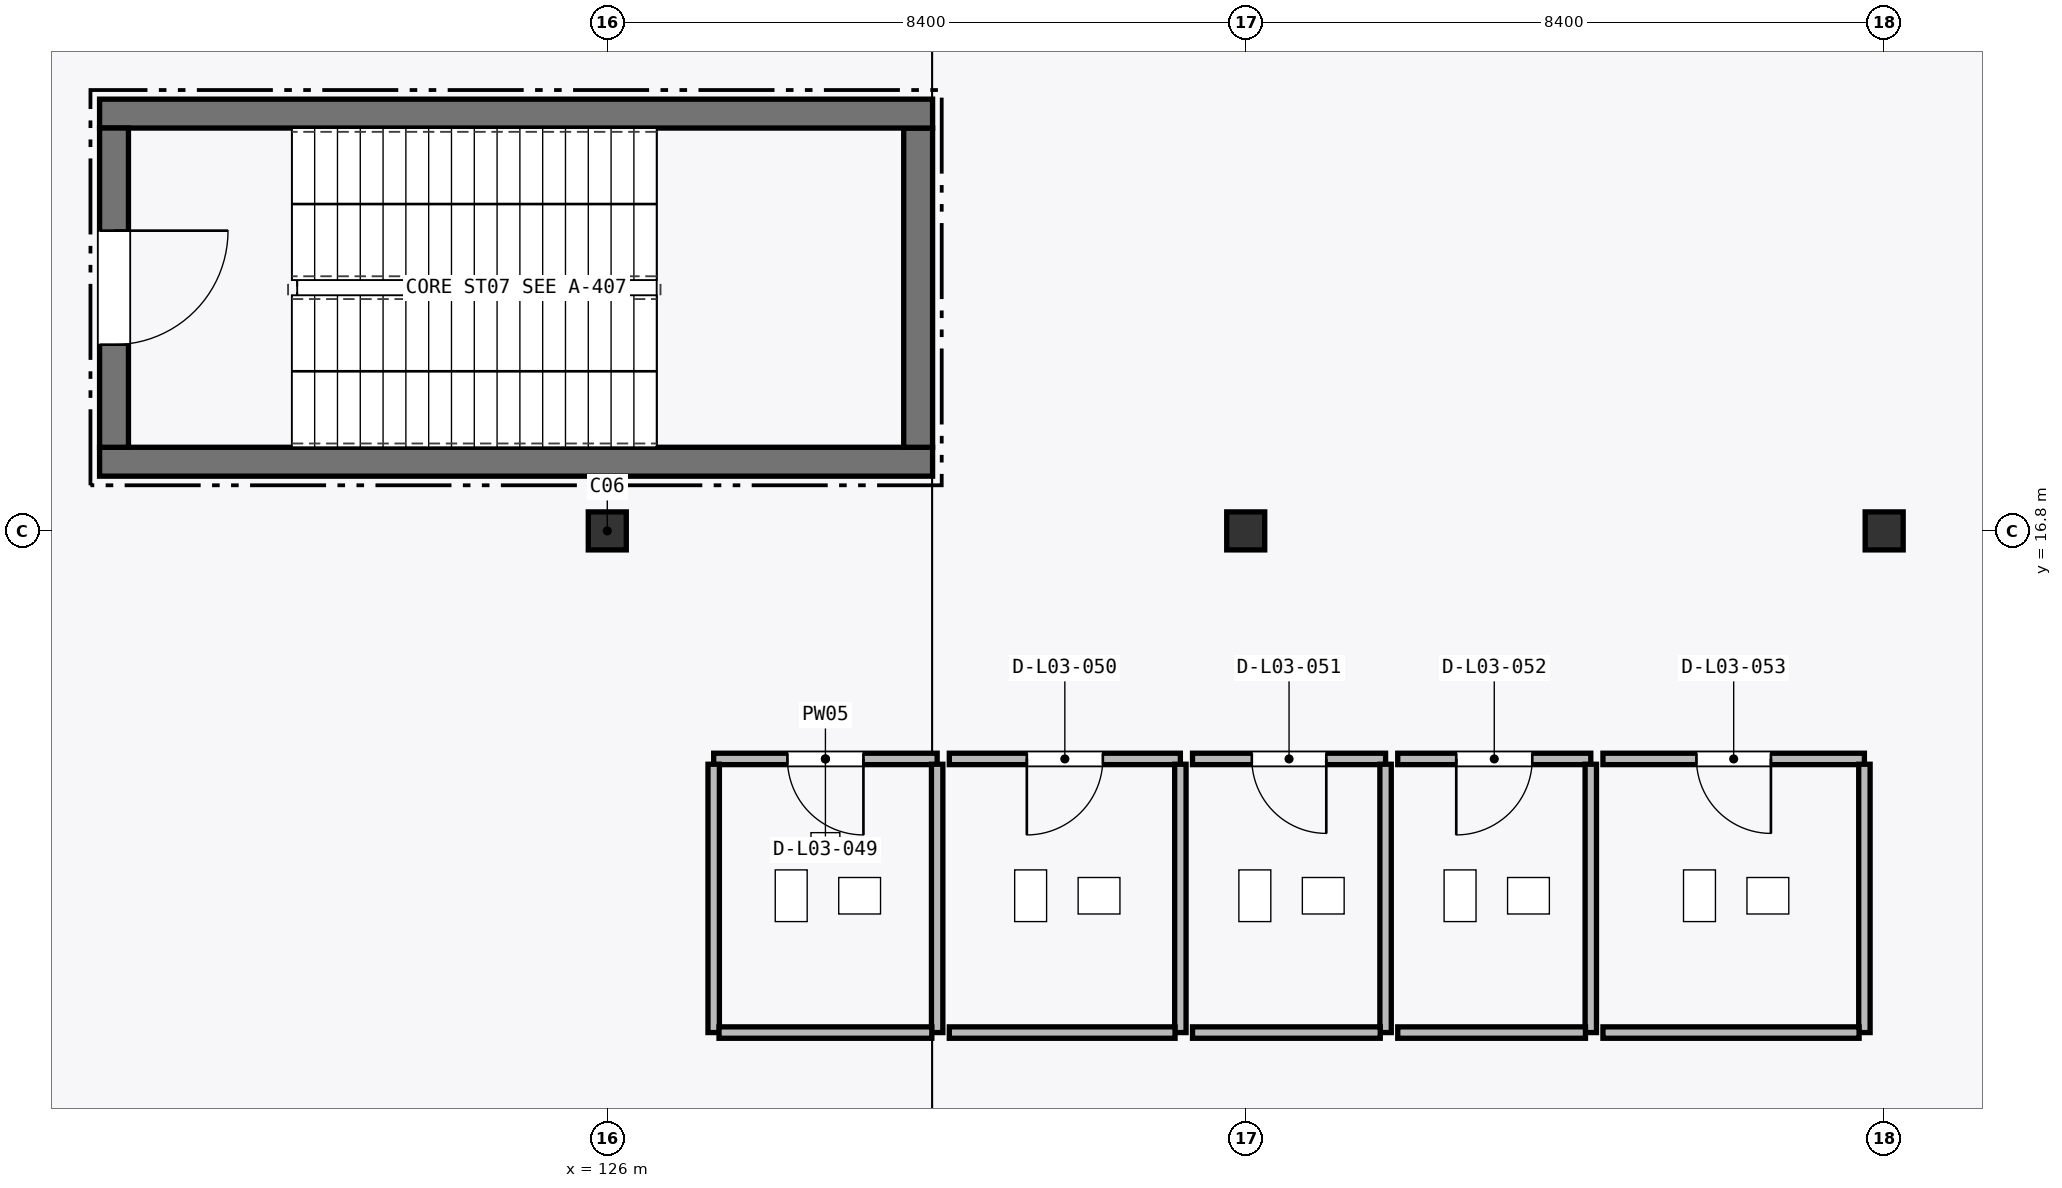
"""IFC4 building model, lengths in metres.
Left out: names, types, materials, properties, quantities, classifications, styles, units other than length and angle.
Written with IfcOpenShell. Run it as: python <this file> out.ifc"""

import sys

from ifc_helpers import new_model, si_unit, direction, frame, frame_2d, origin, origin_2d, place, context, subcontext, project, spatial, rectangle, hollow_rectangle, extrude, element, fill, save


model = new_model("IFC4")
c1 = context("Model", 3, precision=1e-05, world=origin(), true_north=direction((0.0, 1.0)))
c2 = subcontext(c1, "Body", "Model", "MODEL_VIEW")
j1 = project(units=[si_unit("LENGTHUNIT", "METRE"), si_unit("PLANEANGLEUNIT", "RADIAN")], contexts=[c1])
p1 = place(None, origin())
s1 = spatial("IfcSite", under=j1, at=p1, CompositionType="ELEMENT")
p2 = place(p1, origin())
s2 = spatial("IfcBuilding", under=s1, at=p2, CompositionType="ELEMENT")
p3 = place(p2, frame((0.0, 0.0, 11.4)))
s3 = spatial("IfcBuildingStorey", under=s2, at=p3, CompositionType="ELEMENT", Elevation=11.4)
for number, where, z_axis, x_axis in (
    (1, (126.0, 16.8, 0.0), (0.0, 0.0, 1.0), (1.0, 0.0, 0.0)),
    (2, (134.4, 16.8, 0.0), (0.0, 0.0, 1.0), (1.0, 0.0, 0.0)),
    (3, (142.8, 16.8, 0.0), (0.0, 0.0, 1.0), (1.0, 0.0, 0.0)),
):
    element("IfcColumn", number, at=place(p3, frame(where, z_axis=z_axis, x_axis=x_axis)), inside=s3, PredefinedType="COLUMN", context=c2, shape_type="SweptSolid", body=[
        extrude(hollow_rectangle(XDim=0.5, YDim=0.5, WallThickness=0.02, at=origin_2d()), origin(), (0.0, 0.0, 1.0), 5.1),
    ])
p4 = place(p3, frame((119.32, 17.71, 0.0), z_axis=(0.0, 0.0, 1.0), x_axis=(1.0, 0.0, 0.0)))
e4 = element("IfcWall", 4, at=p4, inside=s3, PredefinedType="SHEAR", context=c2, shape_type="SweptSolid", body=[
    extrude(rectangle(XDim=10.96, YDim=0.38, at=frame_2d((5.48, 0.0))), origin(), (0.0, 0.0, 1.0), 4.845),
])
p5 = place(p3, frame((130.09, 17.9, 0.0), z_axis=(0.0, 0.0, 1.0), x_axis=(0.0, 1.0, 0.0)))
e5 = element("IfcWall", 5, at=p5, inside=s3, PredefinedType="SHEAR", context=c2, shape_type="SweptSolid", body=[
    extrude(rectangle(XDim=4.2, YDim=0.38, at=frame_2d((2.1, 0.0))), origin(), (0.0, 0.0, 1.0), 4.845),
])
p6 = place(p3, frame((130.28, 22.29, 0.0), z_axis=(0.0, 0.0, 1.0), x_axis=(-1.0, 0.0, 0.0)))
e6 = element("IfcWall", 6, at=p6, inside=s3, PredefinedType="SHEAR", context=c2, shape_type="SweptSolid", body=[
    extrude(rectangle(XDim=10.96, YDim=0.38, at=frame_2d((5.48, 0.0))), origin(), (0.0, 0.0, 1.0), 4.845),
])
p7 = place(p3, frame((119.51, 22.1, 0.0), z_axis=(0.0, 0.0, 1.0), x_axis=(0.0, -1.0, 0.0)))
e7 = element("IfcWall", 7, at=p7, inside=s3, PredefinedType="SHEAR", context=c2, shape_type="SweptSolid", body=[
    extrude(rectangle(XDim=4.2, YDim=0.38, at=frame_2d((2.1, 0.0))), origin(), (0.0, 0.0, 1.0), 4.845),
])
p8 = place(p7, frame((1.35, 0.0, 0.0)))
e8 = element("IfcOpeningElement", 8, at=p8, cuts=e7, PredefinedType="OPENING", context=c2, shape_type="SweptSolid", body=[
    extrude(rectangle(XDim=1.5, YDim=2.15, at=frame_2d((0.75, 1.075))), frame((0.0, 0.2, 0.0), z_axis=(0.0, -1.0, 0.0), x_axis=(1.0, 0.0, 0.0)), (0.0, 0.0, 1.0), 0.4),
])
p9 = place(p3, frame((130.34, 13.8, 0.0), z_axis=(0.0, 0.0, 1.0), x_axis=(-1.0, 0.0, 0.0)))
e9 = element("IfcWall", 9, at=p9, inside=s3, PredefinedType="PARTITIONING", context=c2, shape_type="SweptSolid", body=[
    extrude(rectangle(XDim=2.94, YDim=0.15, at=frame_2d((1.47, 0.0))), origin(), (0.0, 0.0, 1.0), 4.845),
])
p10 = place(p9, frame((0.97, 0.0, 0.0)))
e10 = element("IfcOpeningElement", 10, at=p10, cuts=e9, PredefinedType="OPENING", context=c2, shape_type="SweptSolid", body=[
    extrude(rectangle(XDim=1.0, YDim=2.1, at=frame_2d((0.5, 1.05))), frame((0.0, 0.085, 0.0), z_axis=(0.0, -1.0, 0.0), x_axis=(1.0, 0.0, 0.0)), (0.0, 0.0, 1.0), 0.17),
])
for number, where, z_axis, x_axis in (
    (11, (130.34, 10.2, 0.0), (0.0, 0.0, 1.0), (0.0, 1.0, 0.0)),
    (12, (127.4, 13.73, 0.0), (0.0, 0.0, 1.0), (0.0, -1.0, 0.0)),
):
    element("IfcWall", number, at=place(p3, frame(where, z_axis=z_axis, x_axis=x_axis)), inside=s3, PredefinedType="PARTITIONING", context=c2, shape_type="SweptSolid", body=[
        extrude(rectangle(XDim=3.53, YDim=0.15, at=frame_2d((1.765, 0.0))), origin(), (0.0, 0.0, 1.0), 4.845),
    ])
p11 = place(p3, frame((127.47, 10.2, 0.0), z_axis=(0.0, 0.0, 1.0), x_axis=(1.0, 0.0, 0.0)))
e13 = element("IfcWall", 13, at=p11, inside=s3, PredefinedType="PARTITIONING", context=c2, shape_type="SweptSolid", body=[
    extrude(rectangle(XDim=2.8, YDim=0.15, at=frame_2d((1.4, 0.0))), origin(), (0.0, 0.0, 1.0), 4.845),
])
p12 = place(p3, frame((133.54, 13.8, 0.0), z_axis=(0.0, 0.0, 1.0), x_axis=(-1.0, 0.0, 0.0)))
e14 = element("IfcWall", 14, at=p12, inside=s3, PredefinedType="PARTITIONING", context=c2, shape_type="SweptSolid", body=[
    extrude(rectangle(XDim=3.04, YDim=0.15, at=frame_2d((1.52, 0.0))), origin(), (0.0, 0.0, 1.0), 4.845),
])
p13 = place(p12, frame((1.02, 0.0, 0.0)))
e15 = element("IfcOpeningElement", 15, at=p13, cuts=e14, PredefinedType="OPENING", context=c2, shape_type="SweptSolid", body=[
    extrude(rectangle(XDim=1.0, YDim=2.1, at=frame_2d((0.5, 1.05))), frame((0.0, 0.085, 0.0), z_axis=(0.0, -1.0, 0.0), x_axis=(1.0, 0.0, 0.0)), (0.0, 0.0, 1.0), 0.17),
])
p14 = place(p3, frame((133.54, 10.2, 0.0), z_axis=(0.0, 0.0, 1.0), x_axis=(0.0, 1.0, 0.0)))
e16 = element("IfcWall", 16, at=p14, inside=s3, PredefinedType="PARTITIONING", context=c2, shape_type="SweptSolid", body=[
    extrude(rectangle(XDim=3.53, YDim=0.15, at=frame_2d((1.765, 0.0))), origin(), (0.0, 0.0, 1.0), 4.845),
])
p15 = place(p3, frame((130.5, 10.2, 0.0), z_axis=(0.0, 0.0, 1.0), x_axis=(1.0, 0.0, 0.0)))
e17 = element("IfcWall", 17, at=p15, inside=s3, PredefinedType="PARTITIONING", context=c2, shape_type="SweptSolid", body=[
    extrude(rectangle(XDim=2.97, YDim=0.15, at=frame_2d((1.485, 0.0))), origin(), (0.0, 0.0, 1.0), 4.845),
])
p16 = place(p3, frame((136.24, 13.8, 0.0), z_axis=(0.0, 0.0, 1.0), x_axis=(-1.0, 0.0, 0.0)))
e18 = element("IfcWall", 18, at=p16, inside=s3, PredefinedType="PARTITIONING", context=c2, shape_type="SweptSolid", body=[
    extrude(rectangle(XDim=2.54, YDim=0.15, at=frame_2d((1.27, 0.0))), origin(), (0.0, 0.0, 1.0), 4.845),
])
p17 = place(p16, frame((0.78, 0.0, 0.0)))
e19 = element("IfcOpeningElement", 19, at=p17, cuts=e18, PredefinedType="OPENING", context=c2, shape_type="SweptSolid", body=[
    extrude(rectangle(XDim=0.98, YDim=2.1, at=frame_2d((0.49, 1.05))), frame((0.0, 0.085, 0.0), z_axis=(0.0, -1.0, 0.0), x_axis=(1.0, 0.0, 0.0)), (0.0, 0.0, 1.0), 0.17),
])
p18 = place(p3, frame((136.24, 10.2, 0.0), z_axis=(0.0, 0.0, 1.0), x_axis=(0.0, 1.0, 0.0)))
e20 = element("IfcWall", 20, at=p18, inside=s3, PredefinedType="PARTITIONING", context=c2, shape_type="SweptSolid", body=[
    extrude(rectangle(XDim=3.53, YDim=0.15, at=frame_2d((1.765, 0.0))), origin(), (0.0, 0.0, 1.0), 4.845),
])
p19 = place(p3, frame((133.7, 10.2, 0.0), z_axis=(0.0, 0.0, 1.0), x_axis=(1.0, 0.0, 0.0)))
e21 = element("IfcWall", 21, at=p19, inside=s3, PredefinedType="PARTITIONING", context=c2, shape_type="SweptSolid", body=[
    extrude(rectangle(XDim=2.47, YDim=0.15, at=frame_2d((1.235, 0.0))), origin(), (0.0, 0.0, 1.0), 4.845),
])
p20 = place(p3, frame((138.94, 13.8, 0.0), z_axis=(0.0, 0.0, 1.0), x_axis=(-1.0, 0.0, 0.0)))
e22 = element("IfcWall", 22, at=p20, inside=s3, PredefinedType="PARTITIONING", context=c2, shape_type="SweptSolid", body=[
    extrude(rectangle(XDim=2.54, YDim=0.15, at=frame_2d((1.27, 0.0))), origin(), (0.0, 0.0, 1.0), 4.845),
])
p21 = place(p20, frame((0.77, 0.0, 0.0)))
e23 = element("IfcOpeningElement", 23, at=p21, cuts=e22, PredefinedType="OPENING", context=c2, shape_type="SweptSolid", body=[
    extrude(rectangle(XDim=1.0, YDim=2.1, at=frame_2d((0.5, 1.05))), frame((0.0, 0.085, 0.0), z_axis=(0.0, -1.0, 0.0), x_axis=(1.0, 0.0, 0.0)), (0.0, 0.0, 1.0), 0.17),
])
p22 = place(p3, frame((138.94, 10.2, 0.0), z_axis=(0.0, 0.0, 1.0), x_axis=(0.0, 1.0, 0.0)))
e24 = element("IfcWall", 24, at=p22, inside=s3, PredefinedType="PARTITIONING", context=c2, shape_type="SweptSolid", body=[
    extrude(rectangle(XDim=3.53, YDim=0.15, at=frame_2d((1.765, 0.0))), origin(), (0.0, 0.0, 1.0), 4.845),
])
p23 = place(p3, frame((136.4, 10.2, 0.0), z_axis=(0.0, 0.0, 1.0), x_axis=(1.0, 0.0, 0.0)))
e25 = element("IfcWall", 25, at=p23, inside=s3, PredefinedType="PARTITIONING", context=c2, shape_type="SweptSolid", body=[
    extrude(rectangle(XDim=2.47, YDim=0.15, at=frame_2d((1.235, 0.0))), origin(), (0.0, 0.0, 1.0), 4.845),
])
p24 = place(p3, frame((142.54, 13.8, 0.0), z_axis=(0.0, 0.0, 1.0), x_axis=(-1.0, 0.0, 0.0)))
e26 = element("IfcWall", 26, at=p24, inside=s3, PredefinedType="PARTITIONING", context=c2, shape_type="SweptSolid", body=[
    extrude(rectangle(XDim=3.44, YDim=0.15, at=frame_2d((1.72, 0.0))), origin(), (0.0, 0.0, 1.0), 4.845),
])
p25 = place(p24, frame((1.23, 0.0, 0.0)))
e27 = element("IfcOpeningElement", 27, at=p25, cuts=e26, PredefinedType="OPENING", context=c2, shape_type="SweptSolid", body=[
    extrude(rectangle(XDim=0.98, YDim=2.1, at=frame_2d((0.49, 1.05))), frame((0.0, 0.085, 0.0), z_axis=(0.0, -1.0, 0.0), x_axis=(1.0, 0.0, 0.0)), (0.0, 0.0, 1.0), 0.17),
])
p26 = place(p3, frame((142.54, 10.2, 0.0), z_axis=(0.0, 0.0, 1.0), x_axis=(0.0, 1.0, 0.0)))
e28 = element("IfcWall", 28, at=p26, inside=s3, PredefinedType="PARTITIONING", context=c2, shape_type="SweptSolid", body=[
    extrude(rectangle(XDim=3.53, YDim=0.15, at=frame_2d((1.765, 0.0))), origin(), (0.0, 0.0, 1.0), 4.129),
])
p27 = place(p3, frame((139.1, 10.2, 0.0), z_axis=(0.0, 0.0, 1.0), x_axis=(1.0, 0.0, 0.0)))
e29 = element("IfcWall", 29, at=p27, inside=s3, PredefinedType="PARTITIONING", context=c2, shape_type="SweptSolid", body=[
    extrude(rectangle(XDim=3.37, YDim=0.15, at=frame_2d((1.685, 0.0))), origin(), (0.0, 0.0, 1.0), 4.845),
])
p28 = place(p8, origin())
e30 = element("IfcDoor", 30, at=p28, inside=s3, OperationType="SINGLE_SWING_LEFT", PredefinedType="DOOR", context=c2, shape_type="SweptSolid", body=[
    extrude(rectangle(XDim=1.5, YDim=2.15, at=frame_2d((0.75, 1.075))), frame((0.0, 0.025, 0.0), z_axis=(0.0, -1.0, 0.0), x_axis=(1.0, 0.0, 0.0)), (0.0, 0.0, 1.0), 0.05),
])
fill(e8, e30)
p29 = place(p10, origin())
e31 = element("IfcDoor", 31, at=p29, inside=s3, OperationType="SINGLE_SWING_LEFT", PredefinedType="DOOR", context=c2, shape_type="SweptSolid", body=[
    extrude(rectangle(XDim=1.0, YDim=2.1, at=frame_2d((0.5, 1.05))), frame((0.0, 0.025, 0.0), z_axis=(0.0, -1.0, 0.0), x_axis=(1.0, 0.0, 0.0)), (0.0, 0.0, 1.0), 0.05),
])
fill(e10, e31)
p30 = place(p13, origin())
e32 = element("IfcDoor", 32, at=p30, inside=s3, OperationType="SINGLE_SWING_RIGHT", PredefinedType="DOOR", context=c2, shape_type="SweptSolid", body=[
    extrude(rectangle(XDim=1.0, YDim=2.1, at=frame_2d((0.5, 1.05))), frame((0.0, 0.025, 0.0), z_axis=(0.0, -1.0, 0.0), x_axis=(1.0, 0.0, 0.0)), (0.0, 0.0, 1.0), 0.05),
])
fill(e15, e32)
p31 = place(p17, origin())
e33 = element("IfcDoor", 33, at=p31, inside=s3, OperationType="SINGLE_SWING_LEFT", PredefinedType="DOOR", context=c2, shape_type="SweptSolid", body=[
    extrude(rectangle(XDim=0.98, YDim=2.1, at=frame_2d((0.49, 1.05))), frame((0.0, 0.025, 0.0), z_axis=(0.0, -1.0, 0.0), x_axis=(1.0, 0.0, 0.0)), (0.0, 0.0, 1.0), 0.05),
])
fill(e19, e33)
p32 = place(p21, origin())
e34 = element("IfcDoor", 34, at=p32, inside=s3, OperationType="SINGLE_SWING_RIGHT", PredefinedType="DOOR", context=c2, shape_type="SweptSolid", body=[
    extrude(rectangle(XDim=1.0, YDim=2.1, at=frame_2d((0.5, 1.05))), frame((0.0, 0.025, 0.0), z_axis=(0.0, -1.0, 0.0), x_axis=(1.0, 0.0, 0.0)), (0.0, 0.0, 1.0), 0.05),
])
fill(e23, e34)
p33 = place(p25, origin())
e35 = element("IfcDoor", 35, at=p33, inside=s3, OperationType="SINGLE_SWING_LEFT", PredefinedType="DOOR", context=c2, shape_type="SweptSolid", body=[
    extrude(rectangle(XDim=0.98, YDim=2.1, at=frame_2d((0.49, 1.05))), frame((0.0, 0.025, 0.0), z_axis=(0.0, -1.0, 0.0), x_axis=(1.0, 0.0, 0.0)), (0.0, 0.0, 1.0), 0.05),
])
fill(e27, e35)
save(model, sys.argv[1])
